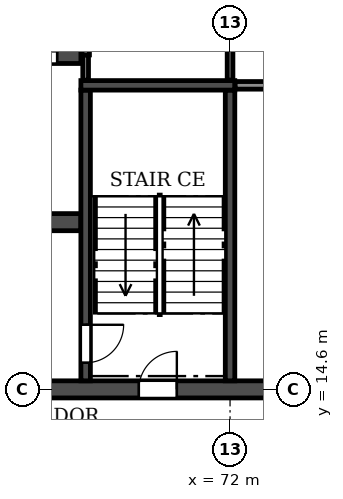
"""IFC4 building model, lengths in metres.
Left out: names, types, materials, properties, quantities, classifications, styles, units other than length and angle.
Written with IfcOpenShell. Run it as: python <this file> out.ifc"""

import sys

from ifc_helpers import new_model, si_unit, direction, frame, frame_2d, origin, place, context, subcontext, project, spatial, rectangle, extrude, element, fill, save


model = new_model("IFC4")
c1 = context("Model", 3, precision=1e-05, world=origin(), true_north=direction((0.0, 1.0)))
c2 = subcontext(c1, "Body", "Model", "MODEL_VIEW")
j1 = project(units=[si_unit("LENGTHUNIT", "METRE"), si_unit("PLANEANGLEUNIT", "RADIAN")], contexts=[c1])
p1 = place(None, origin())
s1 = spatial("IfcSite", under=j1, at=p1, CompositionType="ELEMENT")
p2 = place(p1, origin())
s2 = spatial("IfcBuilding", under=s1, at=p2, CompositionType="ELEMENT")
p3 = place(p2, frame((0.0, 0.0, 10.8)))
s3 = spatial("IfcBuildingStorey", under=s2, at=p3, CompositionType="ELEMENT", Elevation=10.8)
p4 = place(p3, frame((18.0, 14.6, 0.0), z_axis=(0.0, 0.0, 1.0), x_axis=(1.0, 0.0, 0.0)))
e1 = element("IfcWall", 1, at=p4, inside=s3, PredefinedType="SOLIDWALL", context=c2, shape_type="SweptSolid", body=[
    extrude(rectangle(XDim=66.0, YDim=0.45, at=frame_2d((33.0, 0.0))), origin(), (0.0, 0.0, 1.0), 3.92),
])
p5 = place(p4, frame((0.9, 0.0, 0.0)))
e2 = element("IfcOpeningElement", 2, at=p5, cuts=e1, PredefinedType="OPENING", context=c2, shape_type="SweptSolid", body=[
    extrude(rectangle(XDim=1.0, YDim=2.1, at=frame_2d((0.5, 1.05))), frame((0.0, 0.235, 0.0), z_axis=(0.0, -1.0, 0.0), x_axis=(1.0, 0.0, 0.0)), (0.0, 0.0, 1.0), 0.47),
])
p6 = place(p4, frame((8.8, 0.0, 0.0)))
e3 = element("IfcOpeningElement", 3, at=p6, cuts=e1, PredefinedType="OPENING", context=c2, shape_type="SweptSolid", body=[
    extrude(rectangle(XDim=1.0, YDim=2.1, at=frame_2d((0.5, 1.05))), frame((0.0, 0.235, 0.0), z_axis=(0.0, -1.0, 0.0), x_axis=(1.0, 0.0, 0.0)), (0.0, 0.0, 1.0), 0.47),
])
p7 = place(p4, frame((13.4, 0.0, 0.0)))
e4 = element("IfcOpeningElement", 4, at=p7, cuts=e1, PredefinedType="OPENING", context=c2, shape_type="SweptSolid", body=[
    extrude(rectangle(XDim=1.0, YDim=2.1, at=frame_2d((0.5, 1.05))), frame((0.0, 0.235, 0.0), z_axis=(0.0, -1.0, 0.0), x_axis=(1.0, 0.0, 0.0)), (0.0, 0.0, 1.0), 0.47),
])
p8 = place(p4, frame((24.7, 0.0, 0.0)))
e5 = element("IfcOpeningElement", 5, at=p8, cuts=e1, PredefinedType="OPENING", context=c2, shape_type="SweptSolid", body=[
    extrude(rectangle(XDim=1.0, YDim=2.1, at=frame_2d((0.5, 1.05))), frame((0.0, 0.235, 0.0), z_axis=(0.0, -1.0, 0.0), x_axis=(1.0, 0.0, 0.0)), (0.0, 0.0, 1.0), 0.47),
])
p9 = place(p4, frame((28.6, 0.0, 0.0)))
e6 = element("IfcOpeningElement", 6, at=p9, cuts=e1, PredefinedType="OPENING", context=c2, shape_type="SweptSolid", body=[
    extrude(rectangle(XDim=1.0, YDim=2.1, at=frame_2d((0.5, 1.05))), frame((0.0, 0.235, 0.0), z_axis=(0.0, -1.0, 0.0), x_axis=(1.0, 0.0, 0.0)), (0.0, 0.0, 1.0), 0.47),
])
p10 = place(p4, frame((32.5, 0.0, 0.0)))
e7 = element("IfcOpeningElement", 7, at=p10, cuts=e1, PredefinedType="OPENING", context=c2, shape_type="SweptSolid", body=[
    extrude(rectangle(XDim=1.0, YDim=2.1, at=frame_2d((0.5, 1.05))), frame((0.0, 0.235, 0.0), z_axis=(0.0, -1.0, 0.0), x_axis=(1.0, 0.0, 0.0)), (0.0, 0.0, 1.0), 0.47),
])
p11 = place(p4, frame((35.1, 0.0, 0.0)))
e8 = element("IfcOpeningElement", 8, at=p11, cuts=e1, PredefinedType="OPENING", context=c2, shape_type="SweptSolid", body=[
    extrude(rectangle(XDim=1.0, YDim=2.1, at=frame_2d((0.5, 1.05))), frame((0.0, 0.235, 0.0), z_axis=(0.0, -1.0, 0.0), x_axis=(1.0, 0.0, 0.0)), (0.0, 0.0, 1.0), 0.47),
])
p12 = place(p4, frame((39.0, 0.0, 0.0)))
e9 = element("IfcOpeningElement", 9, at=p12, cuts=e1, PredefinedType="OPENING", context=c2, shape_type="SweptSolid", body=[
    extrude(rectangle(XDim=1.0, YDim=2.1, at=frame_2d((0.5, 1.05))), frame((0.0, 0.235, 0.0), z_axis=(0.0, -1.0, 0.0), x_axis=(1.0, 0.0, 0.0)), (0.0, 0.0, 1.0), 0.47),
])
p13 = place(p4, frame((51.6, 0.0, 0.0)))
e10 = element("IfcOpeningElement", 10, at=p13, cuts=e1, PredefinedType="OPENING", context=c2, shape_type="SweptSolid", body=[
    extrude(rectangle(XDim=1.0, YDim=2.1, at=frame_2d((0.5, 1.05))), frame((0.0, 0.235, 0.0), z_axis=(0.0, -1.0, 0.0), x_axis=(1.0, 0.0, 0.0)), (0.0, 0.0, 1.0), 0.47),
])
p14 = place(p4, frame((56.25, 0.0, 0.0)))
e11 = element("IfcOpeningElement", 11, at=p14, cuts=e1, PredefinedType="OPENING", context=c2, shape_type="SweptSolid", body=[
    extrude(rectangle(XDim=0.9, YDim=2.1, at=frame_2d((0.45, 1.05))), frame((0.0, 0.235, 0.0), z_axis=(0.0, -1.0, 0.0), x_axis=(1.0, 0.0, 0.0)), (0.0, 0.0, 1.0), 0.47),
])
p15 = place(p4, frame((64.1, 0.0, 0.0)))
e12 = element("IfcOpeningElement", 12, at=p15, cuts=e1, PredefinedType="OPENING", context=c2, shape_type="SweptSolid", body=[
    extrude(rectangle(XDim=1.0, YDim=2.1, at=frame_2d((0.5, 1.05))), frame((0.0, 0.235, 0.0), z_axis=(0.0, -1.0, 0.0), x_axis=(1.0, 0.0, 0.0)), (0.0, 0.0, 1.0), 0.47),
])
p16 = place(p3, frame((33.925, 19.0, 0.0), z_axis=(0.0, 0.0, 1.0), x_axis=(1.0, 0.0, 0.0)))
e13 = element("IfcWall", 13, at=p16, inside=s3, PredefinedType="SOLIDWALL", context=c2, shape_type="SweptSolid", body=[
    extrude(rectangle(XDim=34.15, YDim=0.45, at=frame_2d((17.075, 0.0))), origin(), (0.0, 0.0, 1.0), 3.92),
])
p17 = place(p16, frame((16.175, 0.0, 0.0)))
e14 = element("IfcOpeningElement", 14, at=p17, cuts=e13, PredefinedType="OPENING", context=c2, shape_type="SweptSolid", body=[
    extrude(rectangle(XDim=1.8, YDim=2.1, at=frame_2d((0.9, 1.05))), frame((0.0, 0.235, 0.0), z_axis=(0.0, -1.0, 0.0), x_axis=(1.0, 0.0, 0.0)), (0.0, 0.0, 1.0), 0.47),
])
p18 = place(p16, frame((1.525, 0.0, 0.0)))
e15 = element("IfcOpeningElement", 15, at=p18, cuts=e13, PredefinedType="OPENING", context=c2, shape_type="SweptSolid", body=[
    extrude(rectangle(XDim=1.8, YDim=2.1, at=frame_2d((0.9, 1.05))), frame((0.0, 0.235, 0.0), z_axis=(0.0, -1.0, 0.0), x_axis=(1.0, 0.0, 0.0)), (0.0, 0.0, 1.0), 0.47),
])
p19 = place(p16, frame((8.725, 0.0, 0.0)))
e16 = element("IfcOpeningElement", 16, at=p19, cuts=e13, PredefinedType="OPENING", context=c2, shape_type="SweptSolid", body=[
    extrude(rectangle(XDim=1.1, YDim=2.1, at=frame_2d((0.55, 1.05))), frame((0.0, 0.235, 0.0), z_axis=(0.0, -1.0, 0.0), x_axis=(1.0, 0.0, 0.0)), (0.0, 0.0, 1.0), 0.47),
])
p20 = place(p16, frame((11.325, 0.0, 0.0)))
e17 = element("IfcOpeningElement", 17, at=p20, cuts=e13, PredefinedType="OPENING", context=c2, shape_type="SweptSolid", body=[
    extrude(rectangle(XDim=1.1, YDim=2.1, at=frame_2d((0.55, 1.05))), frame((0.0, 0.235, 0.0), z_axis=(0.0, -1.0, 0.0), x_axis=(1.0, 0.0, 0.0)), (0.0, 0.0, 1.0), 0.47),
])
p21 = place(p16, frame((13.925, 0.0, 0.0)))
e18 = element("IfcOpeningElement", 18, at=p21, cuts=e13, PredefinedType="OPENING", context=c2, shape_type="SweptSolid", body=[
    extrude(rectangle(XDim=1.1, YDim=2.1, at=frame_2d((0.55, 1.05))), frame((0.0, 0.235, 0.0), z_axis=(0.0, -1.0, 0.0), x_axis=(1.0, 0.0, 0.0)), (0.0, 0.0, 1.0), 0.47),
])
p22 = place(p16, frame((19.125, 0.0, 0.0)))
e19 = element("IfcOpeningElement", 19, at=p22, cuts=e13, PredefinedType="OPENING", context=c2, shape_type="SweptSolid", body=[
    extrude(rectangle(XDim=1.1, YDim=2.1, at=frame_2d((0.55, 1.05))), frame((0.0, 0.235, 0.0), z_axis=(0.0, -1.0, 0.0), x_axis=(1.0, 0.0, 0.0)), (0.0, 0.0, 1.0), 0.47),
])
p23 = place(p16, frame((21.725, 0.0, 0.0)))
e20 = element("IfcOpeningElement", 20, at=p23, cuts=e13, PredefinedType="OPENING", context=c2, shape_type="SweptSolid", body=[
    extrude(rectangle(XDim=1.1, YDim=2.1, at=frame_2d((0.55, 1.05))), frame((0.0, 0.235, 0.0), z_axis=(0.0, -1.0, 0.0), x_axis=(1.0, 0.0, 0.0)), (0.0, 0.0, 1.0), 0.47),
])
p24 = place(p16, frame((24.325, 0.0, 0.0)))
e21 = element("IfcOpeningElement", 21, at=p24, cuts=e13, PredefinedType="OPENING", context=c2, shape_type="SweptSolid", body=[
    extrude(rectangle(XDim=1.1, YDim=2.1, at=frame_2d((0.55, 1.05))), frame((0.0, 0.235, 0.0), z_axis=(0.0, -1.0, 0.0), x_axis=(1.0, 0.0, 0.0)), (0.0, 0.0, 1.0), 0.47),
])
p25 = place(p16, frame((30.825, 0.0, 0.0)))
e22 = element("IfcOpeningElement", 22, at=p25, cuts=e13, PredefinedType="OPENING", context=c2, shape_type="SweptSolid", body=[
    extrude(rectangle(XDim=1.8, YDim=2.1, at=frame_2d((0.9, 1.05))), frame((0.0, 0.235, 0.0), z_axis=(0.0, -1.0, 0.0), x_axis=(1.0, 0.0, 0.0)), (0.0, 0.0, 1.0), 0.47),
])
p26 = place(p3, frame((33.925, 23.4, 0.0), z_axis=(0.0, 0.0, 1.0), x_axis=(1.0, 0.0, 0.0)))
e23 = element("IfcWall", 23, at=p26, inside=s3, PredefinedType="SOLIDWALL", context=c2, shape_type="SweptSolid", body=[
    extrude(rectangle(XDim=34.15, YDim=0.45, at=frame_2d((17.075, 0.0))), origin(), (0.0, 0.0, 1.0), 3.92),
])
p27 = place(p26, frame((16.175, 0.0, 0.0)))
e24 = element("IfcOpeningElement", 24, at=p27, cuts=e23, PredefinedType="OPENING", context=c2, shape_type="SweptSolid", body=[
    extrude(rectangle(XDim=1.8, YDim=2.1, at=frame_2d((0.9, 1.05))), frame((0.0, 0.235, 0.0), z_axis=(0.0, -1.0, 0.0), x_axis=(1.0, 0.0, 0.0)), (0.0, 0.0, 1.0), 0.47),
])
p28 = place(p26, frame((11.025, 0.0, 0.0)))
e25 = element("IfcOpeningElement", 25, at=p28, cuts=e23, PredefinedType="OPENING", context=c2, shape_type="SweptSolid", body=[
    extrude(rectangle(XDim=1.1, YDim=2.1, at=frame_2d((0.55, 1.05))), frame((0.0, 0.235, 0.0), z_axis=(0.0, -1.0, 0.0), x_axis=(1.0, 0.0, 0.0)), (0.0, 0.0, 1.0), 0.47),
])
p29 = place(p26, frame((29.825, 0.0, 0.0)))
e26 = element("IfcOpeningElement", 26, at=p29, cuts=e23, PredefinedType="OPENING", context=c2, shape_type="SweptSolid", body=[
    extrude(rectangle(XDim=1.1, YDim=2.1, at=frame_2d((0.55, 1.05))), frame((0.0, 0.235, 0.0), z_axis=(0.0, -1.0, 0.0), x_axis=(1.0, 0.0, 0.0)), (0.0, 0.0, 1.0), 0.47),
])
p30 = place(p26, frame((32.425, 0.0, 0.0)))
e27 = element("IfcOpeningElement", 27, at=p30, cuts=e23, PredefinedType="OPENING", context=c2, shape_type="SweptSolid", body=[
    extrude(rectangle(XDim=1.1, YDim=2.1, at=frame_2d((0.55, 1.05))), frame((0.0, 0.235, 0.0), z_axis=(0.0, -1.0, 0.0), x_axis=(1.0, 0.0, 0.0)), (0.0, 0.0, 1.0), 0.47),
])
p31 = place(p3, frame((68.2, 14.825, 0.0), z_axis=(0.0, 0.0, 1.0), x_axis=(0.0, 1.0, 0.0)))
e28 = element("IfcWall", 28, at=p31, inside=s3, PredefinedType="SOLIDWALL", context=c2, shape_type="SweptSolid", body=[
    extrude(rectangle(XDim=7.65, YDim=0.25, at=frame_2d((3.825, 0.0))), origin(), (0.0, 0.0, 1.0), 3.92),
])
p32 = place(p31, frame((0.475, 0.0, 0.0)))
e29 = element("IfcOpeningElement", 29, at=p32, cuts=e28, PredefinedType="OPENING", context=c2, shape_type="SweptSolid", body=[
    extrude(rectangle(XDim=1.0, YDim=2.1, at=frame_2d((0.5, 1.05))), frame((0.0, 0.135, 0.0), z_axis=(0.0, -1.0, 0.0), x_axis=(1.0, 0.0, 0.0)), (0.0, 0.0, 1.0), 0.27),
])
p33 = place(p3, frame((72.0, 14.825, 0.0), z_axis=(0.0, 0.0, 1.0), x_axis=(0.0, 1.0, 0.0)))
e30 = element("IfcWall", 30, at=p33, inside=s3, PredefinedType="SOLIDWALL", context=c2, shape_type="SweptSolid", body=[
    extrude(rectangle(XDim=7.65, YDim=0.25, at=frame_2d((3.825, 0.0))), origin(), (0.0, 0.0, 1.0), 3.92),
])
p34 = place(p3, frame((68.075, 22.6, 0.0), z_axis=(0.0, 0.0, 1.0), x_axis=(1.0, 0.0, 0.0)))
e31 = element("IfcWall", 31, at=p34, inside=s3, PredefinedType="SOLIDWALL", context=c2, shape_type="SweptSolid", body=[
    extrude(rectangle(XDim=4.05, YDim=0.25, at=frame_2d((2.025, 0.0))), origin(), (0.0, 0.0, 1.0), 3.92),
])
p35 = place(p3, frame((72.135, 22.6, 0.0), z_axis=(0.0, 0.0, 1.0), x_axis=(1.0, 0.0, 0.0)))
e32 = element("IfcWall", 32, at=p35, inside=s3, PredefinedType="PARTITIONING", context=c2, shape_type="SweptSolid", body=[
    extrude(rectangle(XDim=5.13, YDim=0.2, at=frame_2d((2.565, 0.0))), origin(), (0.0, 0.0, 1.0), 3.92),
])
p36 = place(p3, frame((68.2, 22.735, 0.0), z_axis=(0.0, 0.0, 1.0), x_axis=(0.0, 1.0, 0.0)))
e33 = element("IfcWall", 33, at=p36, inside=s3, PredefinedType="PARTITIONING", context=c2, shape_type="SweptSolid", body=[
    extrude(rectangle(XDim=0.665, YDim=0.15, at=frame_2d((0.333, 0.0))), origin(), (0.0, 0.0, 1.0), 3.92),
])
p37 = place(p3, frame((72.0, 22.735, 0.0), z_axis=(0.0, 0.0, 1.0), x_axis=(0.0, 1.0, 0.0)))
e34 = element("IfcWall", 34, at=p37, inside=s3, PredefinedType="PARTITIONING", context=c2, shape_type="SweptSolid", body=[
    extrude(rectangle(XDim=4.83, YDim=0.15, at=frame_2d((2.415, 0.0))), origin(), (0.0, 0.0, 1.0), 3.92),
])
p38 = place(p3, frame((68.2, 23.4, 0.0), z_axis=(0.0, 0.0, 1.0), x_axis=(0.0, 1.0, 0.0)))
e35 = element("IfcWall", 35, at=p38, inside=s3, PredefinedType="PARTITIONING", context=c2, shape_type="SweptSolid", body=[
    extrude(rectangle(XDim=2.7, YDim=0.2, at=frame_2d((1.35, 0.0))), origin(), (0.0, 0.0, 1.0), 3.92),
])
p39 = place(p13, origin())
e36 = element("IfcDoor", 36, at=p39, inside=s3, OperationType="SINGLE_SWING_RIGHT", PredefinedType="DOOR", context=c2, shape_type="SweptSolid", body=[
    extrude(rectangle(XDim=1.0, YDim=2.1, at=frame_2d((0.5, 1.05))), frame((0.0, 0.025, 0.0), z_axis=(0.0, -1.0, 0.0), x_axis=(1.0, 0.0, 0.0)), (0.0, 0.0, 1.0), 0.05),
])
fill(e10, e36)
p40 = place(p32, frame((1.0, 0.0, 0.0), z_axis=(0.0, 0.0, 1.0), x_axis=(-1.0, 0.0, 0.0)))
e37 = element("IfcDoor", 37, at=p40, inside=s3, OperationType="SINGLE_SWING_LEFT", PredefinedType="DOOR", context=c2, shape_type="SweptSolid", body=[
    extrude(rectangle(XDim=1.0, YDim=2.1, at=frame_2d((0.5, 1.05))), frame((0.0, 0.025, 0.0), z_axis=(0.0, -1.0, 0.0), x_axis=(1.0, 0.0, 0.0)), (0.0, 0.0, 1.0), 0.05),
])
fill(e29, e37)
p41 = place(p30, origin())
e38 = element("IfcDoor", 38, at=p41, inside=s3, OperationType="DOUBLE_DOOR_SLIDING", PredefinedType="DOOR", context=c2, shape_type="SweptSolid", body=[
    extrude(rectangle(XDim=1.1, YDim=2.1, at=frame_2d((0.55, 1.05))), frame((0.0, 0.025, 0.0), z_axis=(0.0, -1.0, 0.0), x_axis=(1.0, 0.0, 0.0)), (0.0, 0.0, 1.0), 0.05),
])
fill(e27, e38)
save(model, sys.argv[1])
